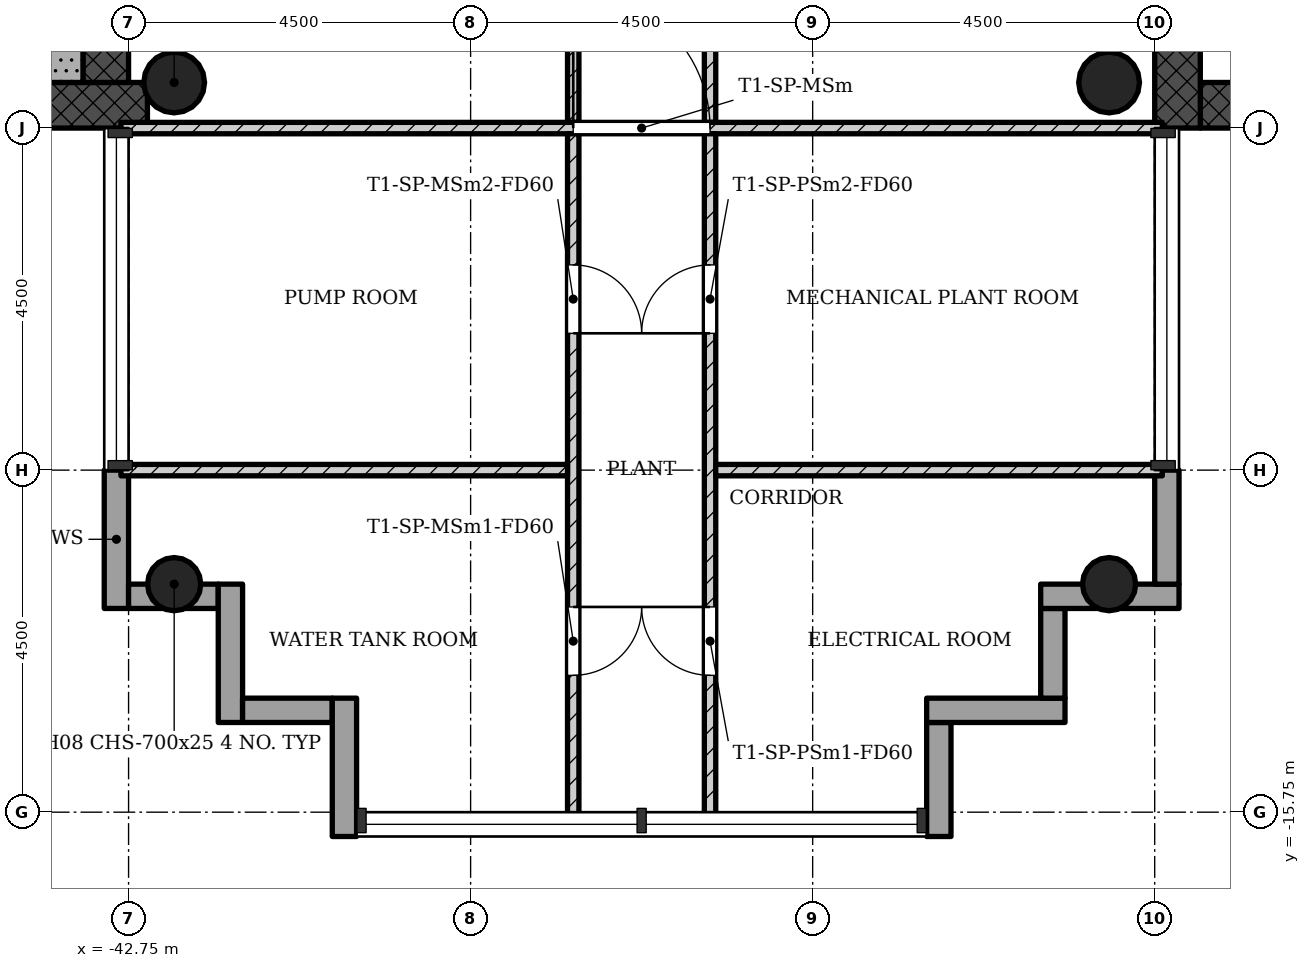
"""IFC4 building model, lengths in metres.
Left out: names, types, materials, properties, quantities, classifications, styles, units other than length and angle.
Written with IfcOpenShell. Run it as: python <this file> out.ifc"""

import sys

from ifc_helpers import new_model, si_unit, direction, frame, frame_2d, origin, origin_2d, place, context, subcontext, project, spatial, rectangle, hollow_circle, extrude, element, fill, save


model = new_model("IFC4")
c1 = context("Model", 3, precision=1e-05, world=origin(), true_north=direction((0.0, 1.0)))
c2 = subcontext(c1, "Body", "Model", "MODEL_VIEW")
j1 = project(units=[si_unit("LENGTHUNIT", "METRE"), si_unit("PLANEANGLEUNIT", "RADIAN")], contexts=[c1])
p1 = place(None, origin())
s1 = spatial("IfcSite", under=j1, at=p1, CompositionType="ELEMENT")
p2 = place(p1, origin())
s2 = spatial("IfcBuilding", under=s1, at=p2, CompositionType="ELEMENT")
p3 = place(p2, frame((0.0, 0.0, 233.4)))
s3 = spatial("IfcBuildingStorey", under=s2, at=p3, CompositionType="ELEMENT", Elevation=233.4)
p4 = place(p3, frame((-28.65, -6.45, 0.0), z_axis=(0.0, 0.0, 1.0), x_axis=(1.0, 0.0, 0.0)))
e1 = element("IfcWall", 1, at=p4, inside=s3, PredefinedType="SHEAR", context=c2, shape_type="SweptSolid", body=[
    extrude(rectangle(XDim=8.4, YDim=0.6, at=frame_2d((4.2, 0.0))), origin(), (0.0, 0.0, 1.0), 4.5),
])
p5 = place(p3, frame((-28.95, 6.15, 0.0), z_axis=(0.0, 0.0, 1.0), x_axis=(0.0, -1.0, 0.0)))
e2 = element("IfcWall", 2, at=p5, inside=s3, PredefinedType="SHEAR", context=c2, shape_type="SweptSolid", body=[
    extrude(rectangle(XDim=12.9, YDim=0.6, at=frame_2d((6.45, 0.0))), origin(), (0.0, 0.0, 1.0), 4.5),
])
p6 = place(p5, frame((5.25, 0.0, 0.0)))
e3 = element("IfcOpeningElement", 3, at=p6, cuts=e2, PredefinedType="OPENING", context=c2, shape_type="SweptSolid", body=[
    extrude(rectangle(XDim=1.8, YDim=2.1, at=frame_2d((0.9, 1.05))), frame((0.0, 0.31, 0.0), z_axis=(0.0, -1.0, 0.0), x_axis=(1.0, 0.0, 0.0)), (0.0, 0.0, 1.0), 0.62),
])
p7 = place(p3, frame((-51.15, -6.45, 0.0), z_axis=(0.0, 0.0, 1.0), x_axis=(1.0, 0.0, 0.0)))
e4 = element("IfcWall", 4, at=p7, inside=s3, PredefinedType="SHEAR", context=c2, shape_type="SweptSolid", body=[
    extrude(rectangle(XDim=8.648, YDim=0.6, at=frame_2d((4.324, 0.0))), origin(), (0.0, 0.0, 1.0), 4.5),
])
p8 = place(p3, frame((-43.05, -6.15, 0.0), z_axis=(0.0, 0.0, 1.0), x_axis=(0.0, 1.0, 0.0)))
e5 = element("IfcWall", 5, at=p8, inside=s3, PredefinedType="SHEAR", context=c2, shape_type="SweptSolid", body=[
    extrude(rectangle(XDim=12.9, YDim=0.6, at=frame_2d((6.45, 0.0))), origin(), (0.0, 0.0, 1.0), 4.5),
])
p9 = place(p8, frame((5.25, 0.0, 0.0)))
e6 = element("IfcOpeningElement", 6, at=p9, cuts=e5, PredefinedType="OPENING", context=c2, shape_type="SweptSolid", body=[
    extrude(rectangle(XDim=1.8, YDim=2.1, at=frame_2d((0.9, 1.05))), frame((0.0, 0.31, 0.0), z_axis=(0.0, -1.0, 0.0), x_axis=(1.0, 0.0, 0.0)), (0.0, 0.0, 1.0), 0.62),
])
for number, where, z_axis, x_axis in (
    (7, (-42.15, -12.75, 0.0), (0.0, 0.0, 1.0), (1.0, 0.0, 0.0)),
    (8, (-29.85, -12.75, 0.0), (0.0, 0.0, 1.0), (1.0, 0.0, 0.0)),
):
    element("IfcColumn", number, at=place(p3, frame(where, z_axis=z_axis, x_axis=x_axis)), inside=s3, PredefinedType="COLUMN", context=c2, shape_type="SweptSolid", body=[
        extrude(hollow_circle(Radius=0.35, WallThickness=0.025, at=origin_2d()), origin(), (0.0, 0.0, 1.0), 4.5),
    ])
for number, where, z_axis, x_axis in (
    (9, (-42.15, -6.15, 0.0), (0.0, 0.0, 1.0), (1.0, 0.0, 0.0)),
    (10, (-29.85, -6.15, 0.0), (0.0, 0.0, 1.0), (1.0, 0.0, 0.0)),
):
    element("IfcColumn", number, at=place(p3, frame(where, z_axis=z_axis, x_axis=x_axis)), inside=s3, PredefinedType="COLUMN", context=c2, shape_type="SweptSolid", body=[
        extrude(hollow_circle(Radius=0.4, WallThickness=0.028, at=origin_2d()), origin(), (0.0, 0.0, 1.0), 4.5),
    ])
p10 = place(p3, frame((-42.91, -11.25, -0.3), z_axis=(0.0, 0.0, 1.0), x_axis=(0.0, -1.0, 0.0)))
e11 = element("IfcWall", 11, at=p10, inside=s3, PredefinedType="STANDARD", context=c2, shape_type="SweptSolid", body=[
    extrude(rectangle(XDim=1.82, YDim=0.32, at=frame_2d((0.91, 0.0))), origin(), (0.0, 0.0, 1.0), 4.5),
])
p11 = place(p3, frame((-42.75, -12.91, -0.3), z_axis=(0.0, 0.0, 1.0), x_axis=(1.0, 0.0, 0.0)))
e12 = element("IfcWall", 12, at=p11, inside=s3, PredefinedType="STANDARD", context=c2, shape_type="SweptSolid", body=[
    extrude(rectangle(XDim=1.18, YDim=0.32, at=frame_2d((0.59, 0.0))), origin(), (0.0, 0.0, 1.0), 4.5),
])
p12 = place(p3, frame((-41.41, -12.75, -0.3), z_axis=(0.0, 0.0, 1.0), x_axis=(0.0, -1.0, 0.0)))
e13 = element("IfcWall", 13, at=p12, inside=s3, PredefinedType="STANDARD", context=c2, shape_type="SweptSolid", body=[
    extrude(rectangle(XDim=1.82, YDim=0.32, at=frame_2d((0.91, 0.0))), origin(), (0.0, 0.0, 1.0), 4.5),
])
p13 = place(p3, frame((-41.25, -14.41, -0.3), z_axis=(0.0, 0.0, 1.0), x_axis=(1.0, 0.0, 0.0)))
e14 = element("IfcWall", 14, at=p13, inside=s3, PredefinedType="STANDARD", context=c2, shape_type="SweptSolid", body=[
    extrude(rectangle(XDim=1.18, YDim=0.32, at=frame_2d((0.59, 0.0))), origin(), (0.0, 0.0, 1.0), 4.5),
])
p14 = place(p3, frame((-39.91, -14.25, -0.3), z_axis=(0.0, 0.0, 1.0), x_axis=(0.0, -1.0, 0.0)))
e15 = element("IfcWall", 15, at=p14, inside=s3, PredefinedType="STANDARD", context=c2, shape_type="SweptSolid", body=[
    extrude(rectangle(XDim=1.82, YDim=0.32, at=frame_2d((0.91, 0.0))), origin(), (0.0, 0.0, 1.0), 4.5),
])
p15 = place(p3, frame((-32.09, -16.07, -0.3), z_axis=(0.0, 0.0, 1.0), x_axis=(0.0, 1.0, 0.0)))
e16 = element("IfcWall", 16, at=p15, inside=s3, PredefinedType="STANDARD", context=c2, shape_type="SweptSolid", body=[
    extrude(rectangle(XDim=1.5, YDim=0.32, at=frame_2d((0.75, 0.0))), origin(), (0.0, 0.0, 1.0), 4.5),
])
p16 = place(p3, frame((-32.25, -14.41, -0.3), z_axis=(0.0, 0.0, 1.0), x_axis=(1.0, 0.0, 0.0)))
e17 = element("IfcWall", 17, at=p16, inside=s3, PredefinedType="STANDARD", context=c2, shape_type="SweptSolid", body=[
    extrude(rectangle(XDim=1.82, YDim=0.32, at=frame_2d((0.91, 0.0))), origin(), (0.0, 0.0, 1.0), 4.5),
])
p17 = place(p3, frame((-30.59, -14.25, -0.3), z_axis=(0.0, 0.0, 1.0), x_axis=(0.0, 1.0, 0.0)))
e18 = element("IfcWall", 18, at=p17, inside=s3, PredefinedType="STANDARD", context=c2, shape_type="SweptSolid", body=[
    extrude(rectangle(XDim=1.18, YDim=0.32, at=frame_2d((0.59, 0.0))), origin(), (0.0, 0.0, 1.0), 4.5),
])
p18 = place(p3, frame((-30.75, -12.91, -0.3), z_axis=(0.0, 0.0, 1.0), x_axis=(1.0, 0.0, 0.0)))
e19 = element("IfcWall", 19, at=p18, inside=s3, PredefinedType="STANDARD", context=c2, shape_type="SweptSolid", body=[
    extrude(rectangle(XDim=1.82, YDim=0.32, at=frame_2d((0.91, 0.0))), origin(), (0.0, 0.0, 1.0), 4.5),
])
p19 = place(p3, frame((-29.09, -12.75, -0.3), z_axis=(0.0, 0.0, 1.0), x_axis=(0.0, 1.0, 0.0)))
e20 = element("IfcWall", 20, at=p19, inside=s3, PredefinedType="STANDARD", context=c2, shape_type="SweptSolid", body=[
    extrude(rectangle(XDim=1.5, YDim=0.32, at=frame_2d((0.75, 0.0))), origin(), (0.0, 0.0, 1.0), 4.5),
])
for number, where, z_axis, x_axis in (
    (21, (-35.1, -6.675, 0.0), (0.0, 0.0, 1.0), (0.0, 1.0, 0.0)),
    (22, (-36.9, -6.675, 0.0), (0.0, 0.0, 1.0), (0.0, 1.0, 0.0)),
):
    element("IfcWall", number, at=place(p3, frame(where, z_axis=z_axis, x_axis=x_axis)), inside=s3, PredefinedType="PARTITIONING", context=c2, shape_type="SweptSolid", body=[
        extrude(rectangle(XDim=5.7, YDim=0.15, at=frame_2d((2.85, 0.0))), origin(), (0.0, 0.0, 1.0), 4.1),
    ])
p20 = place(p3, frame((-42.85, -6.75, 0.0), z_axis=(0.0, 0.0, 1.0), x_axis=(1.0, 0.0, 0.0)))
e23 = element("IfcWall", 23, at=p20, inside=s3, PredefinedType="PARTITIONING", context=c2, shape_type="SweptSolid", body=[
    extrude(rectangle(XDim=13.7, YDim=0.15, at=frame_2d((6.85, 0.0))), origin(), (0.0, 0.0, 1.0), 4.1),
])
p21 = place(p20, frame((5.95, 0.0, 0.0)))
e24 = element("IfcOpeningElement", 24, at=p21, cuts=e23, PredefinedType="OPENING", context=c2, shape_type="SweptSolid", body=[
    extrude(rectangle(XDim=1.8, YDim=2.1, at=frame_2d((0.9, 1.05))), frame((0.0, 0.085, 0.0), z_axis=(0.0, -1.0, 0.0), x_axis=(1.0, 0.0, 0.0)), (0.0, 0.0, 1.0), 0.17),
])
p22 = place(p3, frame((-35.1, -15.85, 0.0), z_axis=(0.0, 0.0, 1.0), x_axis=(0.0, 1.0, 0.0)))
e25 = element("IfcWall", 25, at=p22, inside=s3, PredefinedType="PARTITIONING", context=c2, shape_type="SweptSolid", body=[
    extrude(rectangle(XDim=9.025, YDim=0.15, at=frame_2d((4.513, 0.0))), origin(), (0.0, 0.0, 1.0), 4.1),
])
p23 = place(p22, frame((1.9, 0.0, 0.0)))
e26 = element("IfcOpeningElement", 26, at=p23, cuts=e25, PredefinedType="OPENING", context=c2, shape_type="SweptSolid", body=[
    extrude(rectangle(XDim=0.9, YDim=2.1, at=frame_2d((0.45, 1.05))), frame((0.0, 0.085, 0.0), z_axis=(0.0, -1.0, 0.0), x_axis=(1.0, 0.0, 0.0)), (0.0, 0.0, 1.0), 0.17),
])
p24 = place(p22, frame((6.4, 0.0, 0.0)))
e27 = element("IfcOpeningElement", 27, at=p24, cuts=e25, PredefinedType="OPENING", context=c2, shape_type="SweptSolid", body=[
    extrude(rectangle(XDim=0.9, YDim=2.1, at=frame_2d((0.45, 1.05))), frame((0.0, 0.085, 0.0), z_axis=(0.0, -1.0, 0.0), x_axis=(1.0, 0.0, 0.0)), (0.0, 0.0, 1.0), 0.17),
])
p25 = place(p3, frame((-35.025, -11.25, 0.0), z_axis=(0.0, 0.0, 1.0), x_axis=(1.0, 0.0, 0.0)))
e28 = element("IfcWall", 28, at=p25, inside=s3, PredefinedType="PARTITIONING", context=c2, shape_type="SweptSolid", body=[
    extrude(rectangle(XDim=5.875, YDim=0.15, at=frame_2d((2.938, 0.0))), origin(), (0.0, 0.0, 1.0), 4.1),
])
p26 = place(p3, frame((-36.9, -15.85, 0.0), z_axis=(0.0, 0.0, 1.0), x_axis=(0.0, 1.0, 0.0)))
e29 = element("IfcWall", 29, at=p26, inside=s3, PredefinedType="PARTITIONING", context=c2, shape_type="SweptSolid", body=[
    extrude(rectangle(XDim=9.025, YDim=0.15, at=frame_2d((4.513, 0.0))), origin(), (0.0, 0.0, 1.0), 4.1),
])
p27 = place(p26, frame((1.9, 0.0, 0.0)))
e30 = element("IfcOpeningElement", 30, at=p27, cuts=e29, PredefinedType="OPENING", context=c2, shape_type="SweptSolid", body=[
    extrude(rectangle(XDim=0.9, YDim=2.1, at=frame_2d((0.45, 1.05))), frame((0.0, 0.085, 0.0), z_axis=(0.0, -1.0, 0.0), x_axis=(1.0, 0.0, 0.0)), (0.0, 0.0, 1.0), 0.17),
])
p28 = place(p26, frame((6.4, 0.0, 0.0)))
e31 = element("IfcOpeningElement", 31, at=p28, cuts=e29, PredefinedType="OPENING", context=c2, shape_type="SweptSolid", body=[
    extrude(rectangle(XDim=0.9, YDim=2.1, at=frame_2d((0.45, 1.05))), frame((0.0, 0.085, 0.0), z_axis=(0.0, -1.0, 0.0), x_axis=(1.0, 0.0, 0.0)), (0.0, 0.0, 1.0), 0.17),
])
p29 = place(p3, frame((-36.975, -11.25, 0.0), z_axis=(0.0, 0.0, 1.0), x_axis=(-1.0, 0.0, 0.0)))
e32 = element("IfcWall", 32, at=p29, inside=s3, PredefinedType="PARTITIONING", context=c2, shape_type="SweptSolid", body=[
    extrude(rectangle(XDim=5.875, YDim=0.15, at=frame_2d((2.938, 0.0))), origin(), (0.0, 0.0, 1.0), 4.1),
])
p30 = place(p3, frame((-43.65, -1.85, 0.0), z_axis=(0.0, 0.0, 1.0), x_axis=(0.0, -1.0, 0.0)))
e33 = element("IfcWall", 33, at=p30, inside=s3, PredefinedType="SHEAR", context=c2, shape_type="SweptSolid", body=[
    extrude(rectangle(XDim=4.3, YDim=0.6, at=frame_2d((2.15, 0.0))), origin(), (0.0, 0.0, 1.0), 4.5),
])
p31 = place(p21, origin())
e34 = element("IfcDoor", 34, at=p31, inside=s3, OperationType="SINGLE_SWING_RIGHT", PredefinedType="DOOR", context=c2, shape_type="SweptSolid", body=[
    extrude(rectangle(XDim=1.8, YDim=2.1, at=frame_2d((0.9, 1.05))), frame((0.0, 0.025, 0.0), z_axis=(0.0, -1.0, 0.0), x_axis=(1.0, 0.0, 0.0)), (0.0, 0.0, 1.0), 0.05),
])
fill(e24, e34)
p32 = place(p23, origin())
e35 = element("IfcDoor", 35, at=p32, inside=s3, OperationType="SINGLE_SWING_LEFT", PredefinedType="DOOR", context=c2, shape_type="SweptSolid", body=[
    extrude(rectangle(XDim=0.9, YDim=2.1, at=frame_2d((0.45, 1.05))), frame((0.0, 0.025, 0.0), z_axis=(0.0, -1.0, 0.0), x_axis=(1.0, 0.0, 0.0)), (0.0, 0.0, 1.0), 0.05),
])
fill(e26, e35)
p33 = place(p24, origin())
e36 = element("IfcDoor", 36, at=p33, inside=s3, OperationType="SINGLE_SWING_RIGHT", PredefinedType="DOOR", context=c2, shape_type="SweptSolid", body=[
    extrude(rectangle(XDim=0.9, YDim=2.1, at=frame_2d((0.45, 1.05))), frame((0.0, 0.025, 0.0), z_axis=(0.0, -1.0, 0.0), x_axis=(1.0, 0.0, 0.0)), (0.0, 0.0, 1.0), 0.05),
])
fill(e27, e36)
p34 = place(p27, origin())
e37 = element("IfcDoor", 37, at=p34, inside=s3, OperationType="SINGLE_SWING_RIGHT", PredefinedType="DOOR", context=c2, shape_type="SweptSolid", body=[
    extrude(rectangle(XDim=0.9, YDim=2.1, at=frame_2d((0.45, 1.05))), frame((0.0, 0.025, 0.0), z_axis=(0.0, -1.0, 0.0), x_axis=(1.0, 0.0, 0.0)), (0.0, 0.0, 1.0), 0.05),
])
fill(e30, e37)
p35 = place(p28, origin())
e38 = element("IfcDoor", 38, at=p35, inside=s3, OperationType="SINGLE_SWING_LEFT", PredefinedType="DOOR", context=c2, shape_type="SweptSolid", body=[
    extrude(rectangle(XDim=0.9, YDim=2.1, at=frame_2d((0.45, 1.05))), frame((0.0, 0.025, 0.0), z_axis=(0.0, -1.0, 0.0), x_axis=(1.0, 0.0, 0.0)), (0.0, 0.0, 1.0), 0.05),
])
fill(e31, e38)
save(model, sys.argv[1])
